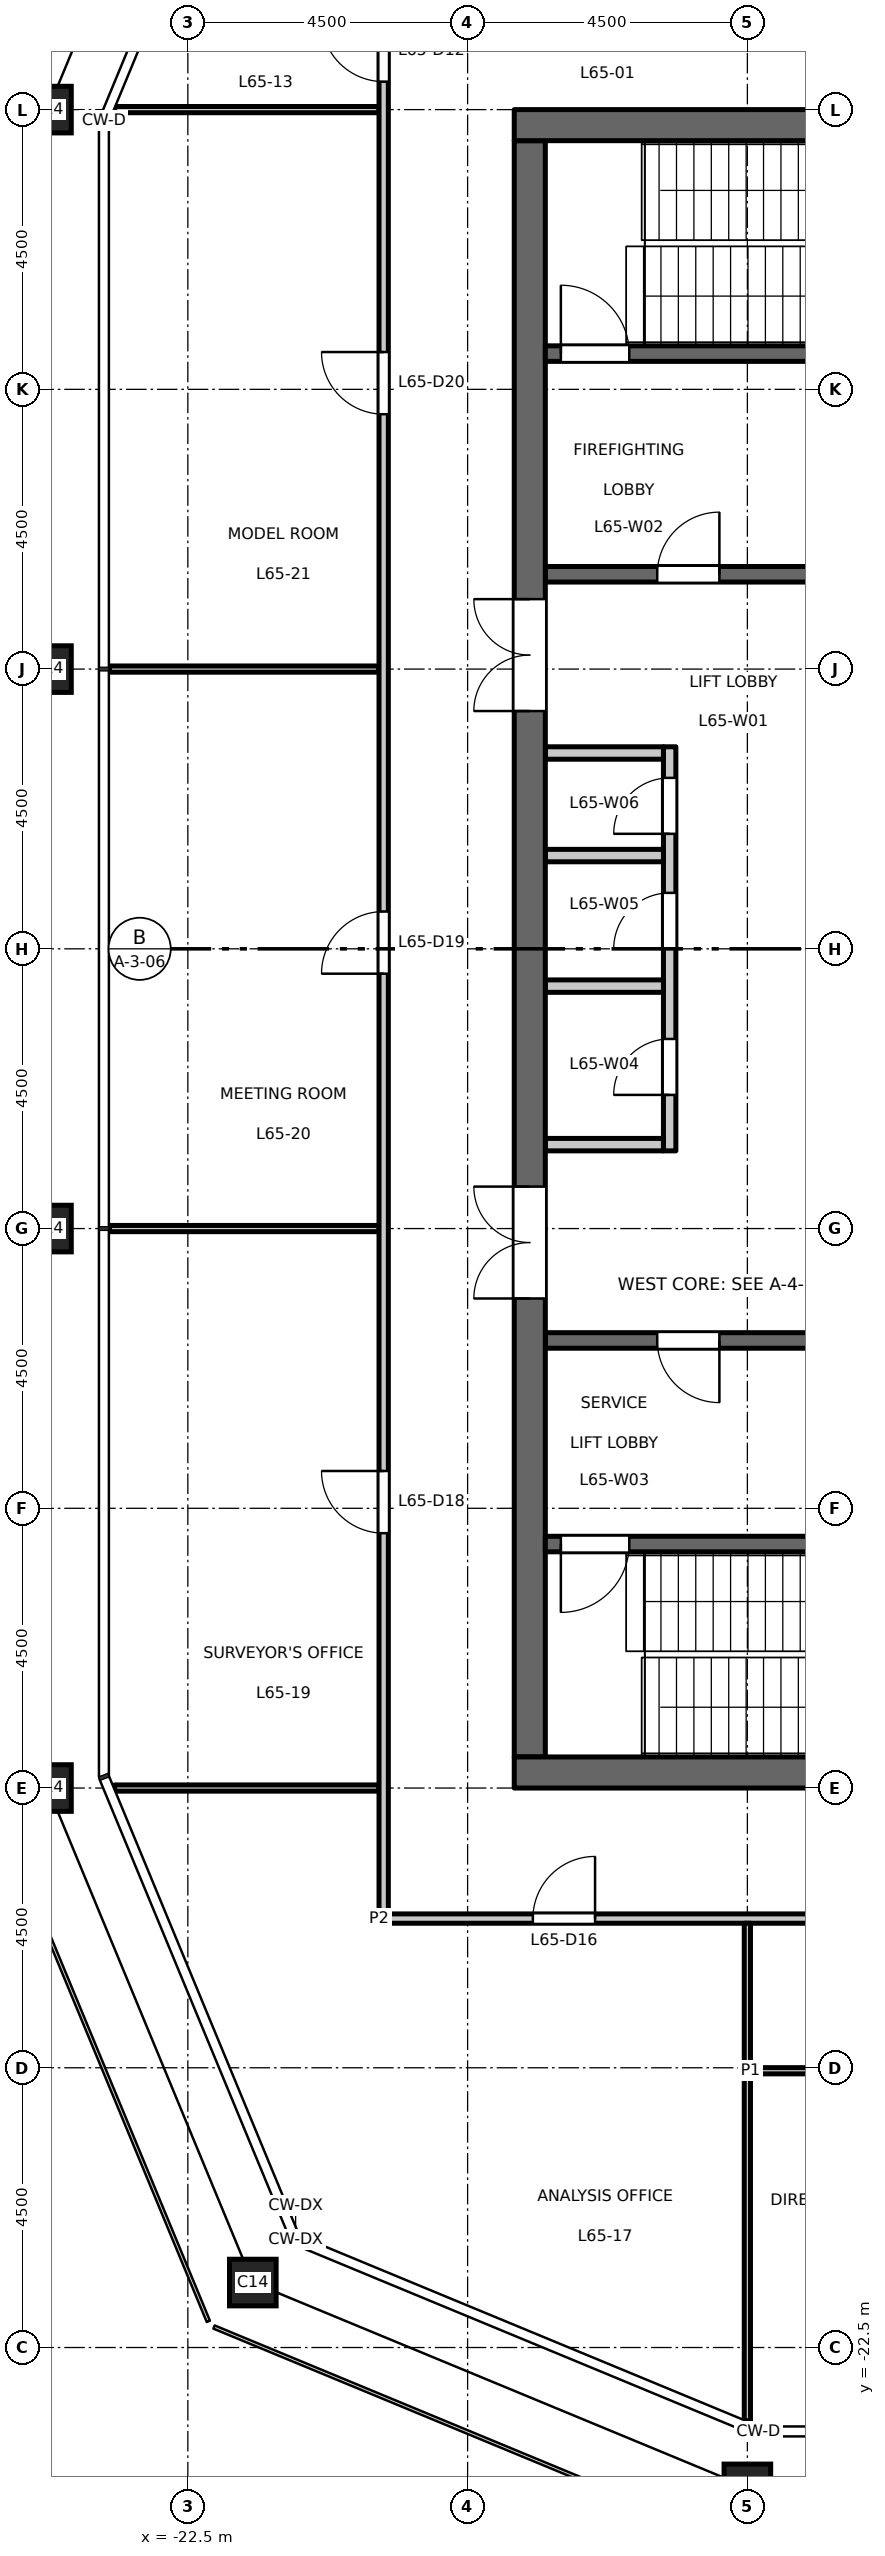
"""IFC4 building model, lengths in metres.
Left out: names, types, materials, properties, quantities, classifications, styles, units other than length and angle.
Written with IfcOpenShell. Run it as: python <this file> out.ifc"""

import sys

from ifc_helpers import new_model, si_unit, direction, frame, frame_2d, origin, origin_2d, place, context, subcontext, project, spatial, rectangle, hollow_rectangle, extrude, element, fill, save


model = new_model("IFC4")
c1 = context("Model", 3, precision=1e-05, world=origin(), true_north=direction((0.0, 1.0)))
c2 = subcontext(c1, "Body", "Model", "MODEL_VIEW")
j1 = project(units=[si_unit("LENGTHUNIT", "METRE"), si_unit("PLANEANGLEUNIT", "RADIAN")], contexts=[c1])
p1 = place(None, origin())
s1 = spatial("IfcSite", under=j1, at=p1, CompositionType="ELEMENT")
p2 = place(p1, origin())
s2 = spatial("IfcBuilding", under=s1, at=p2, CompositionType="ELEMENT")
p3 = place(p2, frame((0.0, 0.0, 303.2)))
s3 = spatial("IfcBuildingStorey", under=s2, at=p3, CompositionType="ELEMENT", Elevation=303.2)
for number, where, z_axis, x_axis in (
    (1, (-13.5, -24.75, 0.0), (0.0, 0.0, 1.0), (1.0, 0.0, 0.0)),
    (2, (-24.75, 13.5, 0.0), (0.0, 0.0, 1.0), (1.0, 0.0, 0.0)),
    (3, (-24.75, 4.5, 0.0), (0.0, 0.0, 1.0), (1.0, 0.0, 0.0)),
    (4, (-24.75, -4.5, 0.0), (0.0, 0.0, 1.0), (1.0, 0.0, 0.0)),
    (5, (-24.75, -13.5, 0.0), (0.0, 0.0, 1.0), (1.0, 0.0, 0.0)),
    (6, (-21.455, -21.455, 0.0), (0.0, 0.0, 1.0), (1.0, 0.0, 0.0)),
):
    element("IfcColumn", number, at=place(p3, frame(where, z_axis=z_axis, x_axis=x_axis)), inside=s3, PredefinedType="COLUMN", context=c2, shape_type="SweptSolid", body=[
        extrude(hollow_rectangle(XDim=0.75, YDim=0.75, WallThickness=0.04, at=origin_2d()), origin(), (0.0, 0.0, 1.0), 4.5),
    ])
p4 = place(p3, frame((-14.75, -3.25, 0.0), z_axis=(0.0, 0.0, 1.0), x_axis=(0.0, 1.0, 0.0)))
e7 = element("IfcWall", 7, at=p4, inside=s3, PredefinedType="PARTITIONING", context=c2, shape_type="SweptSolid", body=[
    extrude(rectangle(XDim=6.5, YDim=0.2, at=frame_2d((3.25, 0.0))), origin(), (0.0, 0.0, 1.0), 4.35),
])
p5 = place(p4, frame((0.9, 0.0, 0.0)))
e8 = element("IfcOpeningElement", 8, at=p5, cuts=e7, PredefinedType="OPENING", context=c2, shape_type="SweptSolid", body=[
    extrude(rectangle(XDim=0.9, YDim=2.1, at=frame_2d((0.45, 1.05))), frame((0.0, 0.11, 0.0), z_axis=(0.0, -1.0, 0.0), x_axis=(1.0, 0.0, 0.0)), (0.0, 0.0, 1.0), 0.22),
])
p6 = place(p4, frame((3.25, 0.0, 0.0)))
e9 = element("IfcOpeningElement", 9, at=p6, cuts=e7, PredefinedType="OPENING", context=c2, shape_type="SweptSolid", body=[
    extrude(rectangle(XDim=0.9, YDim=2.1, at=frame_2d((0.45, 1.05))), frame((0.0, 0.11, 0.0), z_axis=(0.0, -1.0, 0.0), x_axis=(1.0, 0.0, 0.0)), (0.0, 0.0, 1.0), 0.22),
])
p7 = place(p4, frame((5.1, 0.0, 0.0)))
e10 = element("IfcOpeningElement", 10, at=p7, cuts=e7, PredefinedType="OPENING", context=c2, shape_type="SweptSolid", body=[
    extrude(rectangle(XDim=0.9, YDim=2.1, at=frame_2d((0.45, 1.05))), frame((0.0, 0.11, 0.0), z_axis=(0.0, -1.0, 0.0), x_axis=(1.0, 0.0, 0.0)), (0.0, 0.0, 1.0), 0.22),
])
for number, where, z_axis, x_axis in (
    (11, (-14.85, 3.15, 0.0), (0.0, 0.0, 1.0), (-1.0, 0.0, 0.0)),
    (12, (-14.85, -3.15, 0.0), (0.0, 0.0, 1.0), (-1.0, 0.0, 0.0)),
    (13, (-14.85, -0.6, 0.0), (0.0, 0.0, 1.0), (-1.0, 0.0, 0.0)),
    (14, (-14.85, 1.5, 0.0), (0.0, 0.0, 1.0), (-1.0, 0.0, 0.0)),
):
    element("IfcWall", number, at=place(p3, frame(where, z_axis=z_axis, x_axis=x_axis)), inside=s3, PredefinedType="PARTITIONING", context=c2, shape_type="SweptSolid", body=[
        extrude(rectangle(XDim=1.9, YDim=0.2, at=frame_2d((0.95, 0.0))), origin(), (0.0, 0.0, 1.0), 4.35),
    ])
p8 = place(p3, frame((-12.15, 6.025, 0.0), z_axis=(0.0, 0.0, 1.0), x_axis=(-1.0, 0.0, 0.0)))
e15 = element("IfcWall", 15, at=p8, inside=s3, PredefinedType="SHEAR", context=c2, shape_type="SweptSolid", body=[
    extrude(rectangle(XDim=4.6, YDim=0.25, at=frame_2d((2.3, 0.0))), origin(), (0.0, 0.0, 1.0), 4.35),
])
p9 = place(p8, frame((1.8, 0.0, 0.0)))
e16 = element("IfcOpeningElement", 16, at=p9, cuts=e15, PredefinedType="OPENING", context=c2, shape_type="SweptSolid", body=[
    extrude(rectangle(XDim=1.0, YDim=2.1, at=frame_2d((0.5, 1.05))), frame((0.0, 0.135, 0.0), z_axis=(0.0, -1.0, 0.0), x_axis=(1.0, 0.0, 0.0)), (0.0, 0.0, 1.0), 0.27),
])
p10 = place(p3, frame((-12.15, -6.3, 0.0), z_axis=(0.0, 0.0, 1.0), x_axis=(-1.0, 0.0, 0.0)))
e17 = element("IfcWall", 17, at=p10, inside=s3, PredefinedType="SHEAR", context=c2, shape_type="SweptSolid", body=[
    extrude(rectangle(XDim=4.6, YDim=0.25, at=frame_2d((2.3, 0.0))), origin(), (0.0, 0.0, 1.0), 4.35),
])
p11 = place(p10, frame((1.8, 0.0, 0.0)))
e18 = element("IfcOpeningElement", 18, at=p11, cuts=e17, PredefinedType="OPENING", context=c2, shape_type="SweptSolid", body=[
    extrude(rectangle(XDim=1.0, YDim=2.1, at=frame_2d((0.5, 1.05))), frame((0.0, 0.135, 0.0), z_axis=(0.0, -1.0, 0.0), x_axis=(1.0, 0.0, 0.0)), (0.0, 0.0, 1.0), 0.27),
])
p12 = place(p3, frame((-17.0, -13.0, 0.0), z_axis=(0.0, 0.0, 1.0), x_axis=(0.0, 1.0, 0.0)))
e19 = element("IfcWall", 19, at=p12, inside=s3, PredefinedType="SHEAR", context=c2, shape_type="SweptSolid", body=[
    extrude(rectangle(XDim=26.0, YDim=0.5, at=frame_2d((13.0, 0.0))), origin(), (0.0, 0.0, 1.0), 4.35),
])
p13 = place(p12, frame((16.825, 0.0, 0.0)))
e20 = element("IfcOpeningElement", 20, at=p13, cuts=e19, PredefinedType="OPENING", context=c2, shape_type="SweptSolid", body=[
    extrude(rectangle(XDim=1.8, YDim=2.1, at=frame_2d((0.9, 1.05))), frame((0.0, 0.26, 0.0), z_axis=(0.0, -1.0, 0.0), x_axis=(1.0, 0.0, 0.0)), (0.0, 0.0, 1.0), 0.52),
])
p14 = place(p12, frame((7.375, 0.0, 0.0)))
e21 = element("IfcOpeningElement", 21, at=p14, cuts=e19, PredefinedType="OPENING", context=c2, shape_type="SweptSolid", body=[
    extrude(rectangle(XDim=1.8, YDim=2.1, at=frame_2d((0.9, 1.05))), frame((0.0, 0.26, 0.0), z_axis=(0.0, -1.0, 0.0), x_axis=(1.0, 0.0, 0.0)), (0.0, 0.0, 1.0), 0.52),
])
p15 = place(p3, frame((-8.75, 9.575, 0.0), z_axis=(0.0, 0.0, 1.0), x_axis=(-1.0, 0.0, 0.0)))
e22 = element("IfcWall", 22, at=p15, inside=s3, PredefinedType="SHEAR", context=c2, shape_type="SweptSolid", body=[
    extrude(rectangle(XDim=8.0, YDim=0.25, at=frame_2d((4.0, 0.0))), origin(), (0.0, 0.0, 1.0), 4.35),
])
p16 = place(p15, frame((6.65, 0.0, 0.0)))
e23 = element("IfcOpeningElement", 23, at=p16, cuts=e22, PredefinedType="OPENING", context=c2, shape_type="SweptSolid", body=[
    extrude(rectangle(XDim=1.1, YDim=2.1, at=frame_2d((0.55, 1.05))), frame((0.0, 0.135, 0.0), z_axis=(0.0, -1.0, 0.0), x_axis=(1.0, 0.0, 0.0)), (0.0, 0.0, 1.0), 0.27),
])
p17 = place(p3, frame((-8.75, -9.575, 0.0), z_axis=(0.0, 0.0, 1.0), x_axis=(-1.0, 0.0, 0.0)))
e24 = element("IfcWall", 24, at=p17, inside=s3, PredefinedType="SHEAR", context=c2, shape_type="SweptSolid", body=[
    extrude(rectangle(XDim=8.0, YDim=0.25, at=frame_2d((4.0, 0.0))), origin(), (0.0, 0.0, 1.0), 4.35),
])
p18 = place(p17, frame((6.65, 0.0, 0.0)))
e25 = element("IfcOpeningElement", 25, at=p18, cuts=e24, PredefinedType="OPENING", context=c2, shape_type="SweptSolid", body=[
    extrude(rectangle(XDim=1.1, YDim=2.1, at=frame_2d((0.55, 1.05))), frame((0.0, 0.135, 0.0), z_axis=(0.0, -1.0, 0.0), x_axis=(1.0, 0.0, 0.0)), (0.0, 0.0, 1.0), 0.27),
])
for number, where, z_axis, x_axis in (
    (26, (-8.25, 13.25, 0.0), (0.0, 0.0, 1.0), (-1.0, 0.0, 0.0)),
    (27, (-8.25, -13.25, 0.0), (0.0, 0.0, 1.0), (-1.0, 0.0, 0.0)),
):
    element("IfcWall", number, at=place(p3, frame(where, z_axis=z_axis, x_axis=x_axis)), inside=s3, PredefinedType="SHEAR", context=c2, shape_type="SweptSolid", body=[
        extrude(rectangle(XDim=9.0, YDim=0.5, at=frame_2d((4.5, 0.0))), origin(), (0.0, 0.0, 1.0), 4.35),
    ])
p19 = place(p3, frame((-13.45, -18.048, 0.0), z_axis=(0.0, 0.0, 1.0), x_axis=(1.0, 0.0, 0.0)))
e28 = element("IfcWall", 28, at=p19, inside=s3, PredefinedType="PARTITIONING", context=c2, shape_type="SweptSolid", body=[
    extrude(rectangle(XDim=17.9, YDim=0.1, at=frame_2d((8.95, 0.0))), origin(), (0.0, 0.0, 1.0), 3.99),
])
p20 = place(p19, frame((4.85, 0.0, 0.0)))
e29 = element("IfcOpeningElement", 29, at=p20, cuts=e28, PredefinedType="OPENING", context=c2, shape_type="SweptSolid", body=[
    extrude(rectangle(XDim=1.0, YDim=2.1, at=frame_2d((0.5, 1.05))), frame((0.0, 0.06, 0.0), z_axis=(0.0, -1.0, 0.0), x_axis=(1.0, 0.0, 0.0)), (0.0, 0.0, 1.0), 0.12),
])
p21 = place(p19, frame((13.85, 0.0, 0.0)))
e30 = element("IfcOpeningElement", 30, at=p21, cuts=e28, PredefinedType="OPENING", context=c2, shape_type="SweptSolid", body=[
    extrude(rectangle(XDim=1.0, YDim=2.1, at=frame_2d((0.5, 1.05))), frame((0.0, 0.06, 0.0), z_axis=(0.0, -1.0, 0.0), x_axis=(1.0, 0.0, 0.0)), (0.0, 0.0, 1.0), 0.12),
])
p22 = place(p3, frame((-19.425, -15.6, 0.0), z_axis=(0.0, 0.0, 1.0), x_axis=(1.0, 0.0, 0.0)))
e31 = element("IfcWall", 31, at=p22, inside=s3, PredefinedType="PARTITIONING", context=c2, shape_type="SweptSolid", body=[
    extrude(rectangle(XDim=38.85, YDim=0.15, at=frame_2d((19.425, 0.0))), origin(), (0.0, 0.0, 1.0), 4.35),
])
p23 = place(p22, frame((9.825, 0.0, 0.0)))
e32 = element("IfcOpeningElement", 32, at=p23, cuts=e31, PredefinedType="OPENING", context=c2, shape_type="SweptSolid", body=[
    extrude(rectangle(XDim=1.0, YDim=2.1, at=frame_2d((0.5, 1.05))), frame((0.0, 0.085, 0.0), z_axis=(0.0, -1.0, 0.0), x_axis=(1.0, 0.0, 0.0)), (0.0, 0.0, 1.0), 0.17),
])
p24 = place(p22, frame((18.825, 0.0, 0.0)))
e33 = element("IfcOpeningElement", 33, at=p24, cuts=e31, PredefinedType="OPENING", context=c2, shape_type="SweptSolid", body=[
    extrude(rectangle(XDim=1.0, YDim=2.1, at=frame_2d((0.5, 1.05))), frame((0.0, 0.085, 0.0), z_axis=(0.0, -1.0, 0.0), x_axis=(1.0, 0.0, 0.0)), (0.0, 0.0, 1.0), 0.17),
])
p25 = place(p22, frame((27.825, 0.0, 0.0)))
e34 = element("IfcOpeningElement", 34, at=p25, cuts=e31, PredefinedType="OPENING", context=c2, shape_type="SweptSolid", body=[
    extrude(rectangle(XDim=1.0, YDim=2.1, at=frame_2d((0.5, 1.05))), frame((0.0, 0.085, 0.0), z_axis=(0.0, -1.0, 0.0), x_axis=(1.0, 0.0, 0.0)), (0.0, 0.0, 1.0), 0.17),
])
p26 = place(p22, frame((2.475, 0.0, 0.0)))
e35 = element("IfcOpeningElement", 35, at=p26, cuts=e31, PredefinedType="OPENING", context=c2, shape_type="SweptSolid", body=[
    extrude(rectangle(XDim=1.0, YDim=2.1, at=frame_2d((0.5, 1.05))), frame((0.0, 0.085, 0.0), z_axis=(0.0, -1.0, 0.0), x_axis=(1.0, 0.0, 0.0)), (0.0, 0.0, 1.0), 0.17),
])
p27 = place(p22, frame((35.325, 0.0, 0.0)))
e36 = element("IfcOpeningElement", 36, at=p27, cuts=e31, PredefinedType="OPENING", context=c2, shape_type="SweptSolid", body=[
    extrude(rectangle(XDim=1.0, YDim=2.1, at=frame_2d((0.5, 1.05))), frame((0.0, 0.085, 0.0), z_axis=(0.0, -1.0, 0.0), x_axis=(1.0, 0.0, 0.0)), (0.0, 0.0, 1.0), 0.17),
])
p28 = place(p3, frame((-23.678, -13.5, 0.0), z_axis=(0.0, 0.0, 1.0), x_axis=(1.0, 0.0, 0.0)))
e37 = element("IfcWall", 37, at=p28, inside=s3, PredefinedType="PARTITIONING", context=c2, shape_type="SweptSolid", body=[
    extrude(rectangle(XDim=4.253, YDim=0.1, at=frame_2d((2.126, 0.0))), origin(), (0.0, 0.0, 1.0), 4.35),
])
for number, where, z_axis, x_axis in (
    (38, (-23.76, -4.5, 0.0), (0.0, 0.0, 1.0), (1.0, 0.0, 0.0)),
    (39, (-23.76, 4.5, 0.0), (0.0, 0.0, 1.0), (1.0, 0.0, 0.0)),
):
    element("IfcWall", number, at=place(p3, frame(where, z_axis=z_axis, x_axis=x_axis)), inside=s3, PredefinedType="PARTITIONING", context=c2, shape_type="SweptSolid", body=[
        extrude(rectangle(XDim=4.335, YDim=0.1, at=frame_2d((2.167, 0.0))), origin(), (0.0, 0.0, 1.0), 4.35),
    ])
p29 = place(p3, frame((-23.678, 13.5, 0.0), z_axis=(0.0, 0.0, 1.0), x_axis=(1.0, 0.0, 0.0)))
e40 = element("IfcWall", 40, at=p29, inside=s3, PredefinedType="PARTITIONING", context=c2, shape_type="SweptSolid", body=[
    extrude(rectangle(XDim=4.253, YDim=0.1, at=frame_2d((2.126, 0.0))), origin(), (0.0, 0.0, 1.0), 4.35),
])
p30 = place(p3, frame((-19.35, -15.525, 0.0), z_axis=(0.0, 0.0, 1.0), x_axis=(0.0, 1.0, 0.0)))
e41 = element("IfcWall", 41, at=p30, inside=s3, PredefinedType="PARTITIONING", context=c2, shape_type="SweptSolid", body=[
    extrude(rectangle(XDim=31.05, YDim=0.15, at=frame_2d((15.525, 0.0))), origin(), (0.0, 0.0, 1.0), 4.35),
])
p31 = place(p30, frame((29.475, 0.0, 0.0)))
e42 = element("IfcOpeningElement", 42, at=p31, cuts=e41, PredefinedType="OPENING", context=c2, shape_type="SweptSolid", body=[
    extrude(rectangle(XDim=1.0, YDim=2.1, at=frame_2d((0.5, 1.05))), frame((0.0, 0.085, 0.0), z_axis=(0.0, -1.0, 0.0), x_axis=(1.0, 0.0, 0.0)), (0.0, 0.0, 1.0), 0.17),
])
p32 = place(p30, frame((6.125, 0.0, 0.0)))
e43 = element("IfcOpeningElement", 43, at=p32, cuts=e41, PredefinedType="OPENING", context=c2, shape_type="SweptSolid", body=[
    extrude(rectangle(XDim=1.0, YDim=2.1, at=frame_2d((0.5, 1.05))), frame((0.0, 0.085, 0.0), z_axis=(0.0, -1.0, 0.0), x_axis=(1.0, 0.0, 0.0)), (0.0, 0.0, 1.0), 0.17),
])
p33 = place(p30, frame((15.125, 0.0, 0.0)))
e44 = element("IfcOpeningElement", 44, at=p33, cuts=e41, PredefinedType="OPENING", context=c2, shape_type="SweptSolid", body=[
    extrude(rectangle(XDim=1.0, YDim=2.1, at=frame_2d((0.5, 1.05))), frame((0.0, 0.085, 0.0), z_axis=(0.0, -1.0, 0.0), x_axis=(1.0, 0.0, 0.0)), (0.0, 0.0, 1.0), 0.17),
])
p34 = place(p30, frame((24.125, 0.0, 0.0)))
e45 = element("IfcOpeningElement", 45, at=p34, cuts=e41, PredefinedType="OPENING", context=c2, shape_type="SweptSolid", body=[
    extrude(rectangle(XDim=1.0, YDim=2.1, at=frame_2d((0.5, 1.05))), frame((0.0, 0.085, 0.0), z_axis=(0.0, -1.0, 0.0), x_axis=(1.0, 0.0, 0.0)), (0.0, 0.0, 1.0), 0.17),
])
p35 = place(p3, frame((-13.5, -23.678, 0.0), z_axis=(0.0, 0.0, 1.0), x_axis=(0.0, 1.0, 0.0)))
e46 = element("IfcWall", 46, at=p35, inside=s3, PredefinedType="PARTITIONING", context=c2, shape_type="SweptSolid", body=[
    extrude(rectangle(XDim=8.003, YDim=0.1, at=frame_2d((4.001, 0.0))), origin(), (0.0, 0.0, 1.0), 3.75),
])
p36 = place(p9, origin())
e47 = element("IfcDoor", 47, at=p36, inside=s3, OperationType="SINGLE_SWING_LEFT", PredefinedType="DOOR", context=c2, shape_type="SweptSolid", body=[
    extrude(rectangle(XDim=1.0, YDim=2.1, at=frame_2d((0.5, 1.05))), frame((0.0, 0.025, 0.0), z_axis=(0.0, -1.0, 0.0), x_axis=(1.0, 0.0, 0.0)), (0.0, 0.0, 1.0), 0.05),
])
fill(e16, e47)
p37 = place(p11, origin())
e48 = element("IfcDoor", 48, at=p37, inside=s3, OperationType="SINGLE_SWING_RIGHT", PredefinedType="DOOR", context=c2, shape_type="SweptSolid", body=[
    extrude(rectangle(XDim=1.0, YDim=2.1, at=frame_2d((0.5, 1.05))), frame((0.0, 0.025, 0.0), z_axis=(0.0, -1.0, 0.0), x_axis=(1.0, 0.0, 0.0)), (0.0, 0.0, 1.0), 0.05),
])
fill(e18, e48)
p38 = place(p16, origin())
e49 = element("IfcDoor", 49, at=p38, inside=s3, OperationType="SINGLE_SWING_RIGHT", PredefinedType="DOOR", context=c2, shape_type="SweptSolid", body=[
    extrude(rectangle(XDim=1.1, YDim=2.1, at=frame_2d((0.55, 1.05))), frame((0.0, 0.025, 0.0), z_axis=(0.0, -1.0, 0.0), x_axis=(1.0, 0.0, 0.0)), (0.0, 0.0, 1.0), 0.05),
])
fill(e23, e49)
p39 = place(p18, origin())
e50 = element("IfcDoor", 50, at=p39, inside=s3, OperationType="SINGLE_SWING_LEFT", PredefinedType="DOOR", context=c2, shape_type="SweptSolid", body=[
    extrude(rectangle(XDim=1.1, YDim=2.1, at=frame_2d((0.55, 1.05))), frame((0.0, 0.025, 0.0), z_axis=(0.0, -1.0, 0.0), x_axis=(1.0, 0.0, 0.0)), (0.0, 0.0, 1.0), 0.05),
])
fill(e25, e50)
p40 = place(p13, origin())
e51 = element("IfcDoor", 51, at=p40, inside=s3, OperationType="DOUBLE_DOOR_DOUBLE_SWING", PredefinedType="DOOR", context=c2, shape_type="SweptSolid", body=[
    extrude(rectangle(XDim=1.8, YDim=2.1, at=frame_2d((0.9, 1.05))), frame((0.0, 0.025, 0.0), z_axis=(0.0, -1.0, 0.0), x_axis=(1.0, 0.0, 0.0)), (0.0, 0.0, 1.0), 0.05),
])
fill(e20, e51)
p41 = place(p14, origin())
e52 = element("IfcDoor", 52, at=p41, inside=s3, OperationType="DOUBLE_DOOR_DOUBLE_SWING", PredefinedType="DOOR", context=c2, shape_type="SweptSolid", body=[
    extrude(rectangle(XDim=1.8, YDim=2.1, at=frame_2d((0.9, 1.05))), frame((0.0, 0.025, 0.0), z_axis=(0.0, -1.0, 0.0), x_axis=(1.0, 0.0, 0.0)), (0.0, 0.0, 1.0), 0.05),
])
fill(e21, e52)
p42 = place(p5, origin())
e53 = element("IfcDoor", 53, at=p42, inside=s3, OperationType="SINGLE_SWING_RIGHT", PredefinedType="DOOR", context=c2, shape_type="SweptSolid", body=[
    extrude(rectangle(XDim=0.9, YDim=2.1, at=frame_2d((0.45, 1.05))), frame((0.0, 0.025, 0.0), z_axis=(0.0, -1.0, 0.0), x_axis=(1.0, 0.0, 0.0)), (0.0, 0.0, 1.0), 0.05),
])
fill(e8, e53)
p43 = place(p6, origin())
e54 = element("IfcDoor", 54, at=p43, inside=s3, OperationType="SINGLE_SWING_RIGHT", PredefinedType="DOOR", context=c2, shape_type="SweptSolid", body=[
    extrude(rectangle(XDim=0.9, YDim=2.1, at=frame_2d((0.45, 1.05))), frame((0.0, 0.025, 0.0), z_axis=(0.0, -1.0, 0.0), x_axis=(1.0, 0.0, 0.0)), (0.0, 0.0, 1.0), 0.05),
])
fill(e9, e54)
p44 = place(p7, origin())
e55 = element("IfcDoor", 55, at=p44, inside=s3, OperationType="SINGLE_SWING_RIGHT", PredefinedType="DOOR", context=c2, shape_type="SweptSolid", body=[
    extrude(rectangle(XDim=0.9, YDim=2.1, at=frame_2d((0.45, 1.05))), frame((0.0, 0.025, 0.0), z_axis=(0.0, -1.0, 0.0), x_axis=(1.0, 0.0, 0.0)), (0.0, 0.0, 1.0), 0.05),
])
fill(e10, e55)
p45 = place(p31, origin())
e56 = element("IfcDoor", 56, at=p45, inside=s3, OperationType="SINGLE_SWING_RIGHT", PredefinedType="DOOR", context=c2, shape_type="SweptSolid", body=[
    extrude(rectangle(XDim=1.0, YDim=2.1, at=frame_2d((0.5, 1.05))), frame((0.0, 0.025, 0.0), z_axis=(0.0, -1.0, 0.0), x_axis=(1.0, 0.0, 0.0)), (0.0, 0.0, 1.0), 0.05),
])
fill(e42, e56)
p46 = place(p26, origin())
e57 = element("IfcDoor", 57, at=p46, inside=s3, OperationType="SINGLE_SWING_RIGHT", PredefinedType="DOOR", context=c2, shape_type="SweptSolid", body=[
    extrude(rectangle(XDim=1.0, YDim=2.1, at=frame_2d((0.5, 1.05))), frame((0.0, 0.025, 0.0), z_axis=(0.0, -1.0, 0.0), x_axis=(1.0, 0.0, 0.0)), (0.0, 0.0, 1.0), 0.05),
])
fill(e35, e57)
p47 = place(p32, origin())
e58 = element("IfcDoor", 58, at=p47, inside=s3, OperationType="SINGLE_SWING_RIGHT", PredefinedType="DOOR", context=c2, shape_type="SweptSolid", body=[
    extrude(rectangle(XDim=1.0, YDim=2.1, at=frame_2d((0.5, 1.05))), frame((0.0, 0.025, 0.0), z_axis=(0.0, -1.0, 0.0), x_axis=(1.0, 0.0, 0.0)), (0.0, 0.0, 1.0), 0.05),
])
fill(e43, e58)
p48 = place(p33, origin())
e59 = element("IfcDoor", 59, at=p48, inside=s3, OperationType="SINGLE_SWING_LEFT", PredefinedType="DOOR", context=c2, shape_type="SweptSolid", body=[
    extrude(rectangle(XDim=1.0, YDim=2.1, at=frame_2d((0.5, 1.05))), frame((0.0, 0.025, 0.0), z_axis=(0.0, -1.0, 0.0), x_axis=(1.0, 0.0, 0.0)), (0.0, 0.0, 1.0), 0.05),
])
fill(e44, e59)
p49 = place(p34, origin())
e60 = element("IfcDoor", 60, at=p49, inside=s3, OperationType="SINGLE_SWING_RIGHT", PredefinedType="DOOR", context=c2, shape_type="SweptSolid", body=[
    extrude(rectangle(XDim=1.0, YDim=2.1, at=frame_2d((0.5, 1.05))), frame((0.0, 0.025, 0.0), z_axis=(0.0, -1.0, 0.0), x_axis=(1.0, 0.0, 0.0)), (0.0, 0.0, 1.0), 0.05),
])
fill(e45, e60)
save(model, sys.argv[1])
